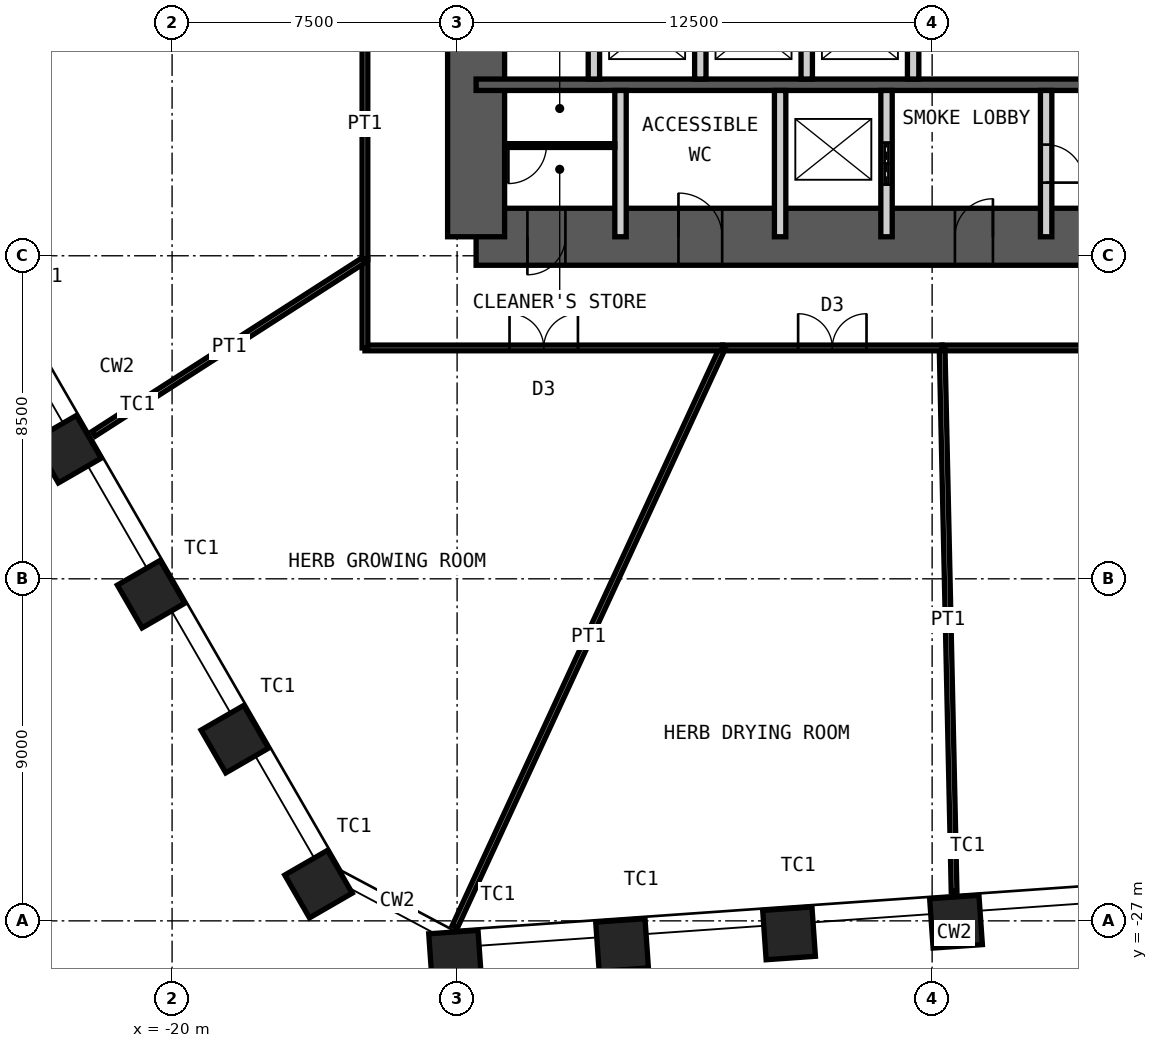
"""IFC4 building model, lengths in metres.
Left out: names, types, materials, properties, quantities, classifications, styles, units other than length and angle.
Written with IfcOpenShell. Run it as: python <this file> out.ifc"""

import sys

from ifc_helpers import new_model, si_unit, direction, frame, frame_2d, origin, origin_2d, place, context, subcontext, project, spatial, rectangle, hollow_rectangle, extrude, element, fill, save


model = new_model("IFC4")
c1 = context("Model", 3, precision=1e-05, world=origin(), true_north=direction((0.0, 1.0)))
c2 = subcontext(c1, "Body", "Model", "MODEL_VIEW")
j1 = project(units=[si_unit("LENGTHUNIT", "METRE"), si_unit("PLANEANGLEUNIT", "RADIAN")], contexts=[c1])
p1 = place(None, origin())
s1 = spatial("IfcSite", under=j1, at=p1, CompositionType="ELEMENT")
p2 = place(p1, origin())
s2 = spatial("IfcBuilding", under=s1, at=p2, CompositionType="ELEMENT")
p3 = place(p2, frame((0.0, 0.0, 52.0)))
s3 = spatial("IfcBuildingStorey", under=s2, at=p3, CompositionType="ELEMENT", Elevation=52.0)
for number, where, z_axis, x_axis in (
    (1, (0.629, -27.022, 0.0), (0.0, 0.0, 1.0), (0.998, 0.07, 0.0)),
    (2, (-3.765, -27.329, 0.0), (0.0, 0.0, 1.0), (0.998, 0.07, 0.0)),
    (3, (-8.159, -27.636, 0.0), (0.0, 0.0, 1.0), (0.998, 0.07, 0.0)),
    (4, (-12.553, -27.944, 0.0), (0.0, 0.0, 1.0), (0.998, 0.07, 0.0)),
    (5, (-16.147, -26.033, 0.0), (0.0, 0.0, 1.0), (0.5, -0.866, 0.0)),
    (6, (-18.349, -22.218, 0.0), (0.0, 0.0, 1.0), (0.5, -0.866, 0.0)),
    (7, (-20.552, -18.404, 0.0), (0.0, 0.0, 1.0), (0.5, -0.866, 0.0)),
    (8, (-22.754, -14.589, 0.0), (0.0, 0.0, 1.0), (0.5, -0.866, 0.0)),
):
    element("IfcColumn", number, at=place(p3, frame(where, z_axis=z_axis, x_axis=x_axis)), inside=s3, PredefinedType="COLUMN", context=c2, shape_type="SweptSolid", body=[
        extrude(hollow_rectangle(XDim=1.3, YDim=1.3, WallThickness=0.1, at=origin_2d()), origin(), (0.0, 0.0, 1.0), 5.0),
    ])
p4 = place(p3, frame((-12.0, -9.0, 0.0), z_axis=(0.0, 0.0, 1.0), x_axis=(1.0, 0.0, 0.0)))
e9 = element("IfcWall", 9, at=p4, inside=s3, PredefinedType="SHEAR", context=c2, shape_type="SweptSolid", body=[
    extrude(rectangle(XDim=24.0, YDim=1.5, at=frame_2d((12.0, 0.0))), origin(), (0.0, 0.0, 1.0), 5.0),
])
p5 = place(p4, frame((1.35, 0.0, 0.0)))
e10 = element("IfcOpeningElement", 10, at=p5, cuts=e9, PredefinedType="OPENING", context=c2, shape_type="SweptSolid", body=[
    extrude(rectangle(XDim=1.0, YDim=2.1, at=frame_2d((0.5, 1.05))), frame((0.0, 0.76, 0.0), z_axis=(0.0, -1.0, 0.0), x_axis=(1.0, 0.0, 0.0)), (0.0, 0.0, 1.0), 1.52),
])
p6 = place(p4, frame((5.325, 0.0, 0.0)))
e11 = element("IfcOpeningElement", 11, at=p6, cuts=e9, PredefinedType="OPENING", context=c2, shape_type="SweptSolid", body=[
    extrude(rectangle(XDim=1.15, YDim=2.1, at=frame_2d((0.575, 1.05))), frame((0.0, 0.76, 0.0), z_axis=(0.0, -1.0, 0.0), x_axis=(1.0, 0.0, 0.0)), (0.0, 0.0, 1.0), 1.52),
])
p7 = place(p4, frame((12.6, 0.0, 0.0)))
e12 = element("IfcOpeningElement", 12, at=p7, cuts=e9, PredefinedType="OPENING", context=c2, shape_type="SweptSolid", body=[
    extrude(rectangle(XDim=1.0, YDim=2.1, at=frame_2d((0.5, 1.05))), frame((0.0, 0.76, 0.0), z_axis=(0.0, -1.0, 0.0), x_axis=(1.0, 0.0, 0.0)), (0.0, 0.0, 1.0), 1.52),
])
p8 = place(p3, frame((-12.0, -9.0, 0.0), z_axis=(0.0, 0.0, 1.0), x_axis=(0.0, 1.0, 0.0)))
e13 = element("IfcWall", 13, at=p8, inside=s3, PredefinedType="SHEAR", context=c2, shape_type="SweptSolid", body=[
    extrude(rectangle(XDim=18.0, YDim=1.5, at=frame_2d((9.0, 0.0))), origin(), (0.0, 0.0, 1.0), 5.0),
])
p9 = place(p8, frame((8.1, 0.0, 0.0)))
e14 = element("IfcOpeningElement", 14, at=p9, cuts=e13, PredefinedType="OPENING", context=c2, shape_type="SweptSolid", body=[
    extrude(rectangle(XDim=1.8, YDim=2.1, at=frame_2d((0.9, 1.05))), frame((0.0, 0.76, 0.0), z_axis=(0.0, -1.0, 0.0), x_axis=(1.0, 0.0, 0.0)), (0.0, 0.0, 1.0), 1.52),
])
p10 = place(p3, frame((-12.0, -5.0, 0.0), z_axis=(0.0, 0.0, 1.0), x_axis=(1.0, 0.0, 0.0)))
e15 = element("IfcWall", 15, at=p10, inside=s3, PredefinedType="SHEAR", context=c2, shape_type="SweptSolid", body=[
    extrude(rectangle(XDim=24.0, YDim=0.3, at=frame_2d((12.0, 0.0))), origin(), (0.0, 0.0, 1.0), 5.0),
])
for number, where, z_axis, x_axis in (
    (16, (-8.9, -4.85, 0.0), (0.0, 0.0, 1.0), (0.0, 1.0, 0.0)),
    (17, (-6.1, -4.85, 0.0), (0.0, 0.0, 1.0), (0.0, 1.0, 0.0)),
    (18, (-3.3, -4.85, 0.0), (0.0, 0.0, 1.0), (0.0, 1.0, 0.0)),
    (19, (-0.5, -4.85, 0.0), (0.0, 0.0, 1.0), (0.0, 1.0, 0.0)),
):
    element("IfcWall", number, at=place(p3, frame(where, z_axis=z_axis, x_axis=x_axis)), inside=s3, PredefinedType="PARTITIONING", context=c2, shape_type="SweptSolid", body=[
        extrude(rectangle(XDim=2.65, YDim=0.3, at=frame_2d((1.325, 0.0))), origin(), (0.0, 0.0, 1.0), 4.78),
    ])
for number, where, z_axis, x_axis in (
    (20, (-8.2, -9.0, 0.0), (0.0, 0.0, 1.0), (0.0, 1.0, 0.0)),
    (21, (-4.0, -9.0, 0.0), (0.0, 0.0, 1.0), (0.0, 1.0, 0.0)),
):
    element("IfcWall", number, at=place(p3, frame(where, z_axis=z_axis, x_axis=x_axis)), inside=s3, PredefinedType="PARTITIONING", context=c2, shape_type="SweptSolid", body=[
        extrude(rectangle(XDim=3.85, YDim=0.3, at=frame_2d((1.925, 0.0))), origin(), (0.0, 0.0, 1.0), 4.78),
    ])
p11 = place(p3, frame((-1.2, -9.0, 0.0), z_axis=(0.0, 0.0, 1.0), x_axis=(0.0, 1.0, 0.0)))
e22 = element("IfcWall", 22, at=p11, inside=s3, PredefinedType="PARTITIONING", context=c2, shape_type="SweptSolid", body=[
    extrude(rectangle(XDim=3.85, YDim=0.3, at=frame_2d((1.925, 0.0))), origin(), (0.0, 0.0, 1.0), 4.78),
])
p12 = place(p11, frame((1.375, 0.0, 0.0)))
e23 = element("IfcOpeningElement", 23, at=p12, cuts=e22, PredefinedType="OPENING", context=c2, shape_type="SweptSolid", body=[
    extrude(rectangle(XDim=1.1, YDim=2.4, at=frame_2d((0.55, 1.2))), frame((0.0, 0.16, 0.0), z_axis=(0.0, -1.0, 0.0), x_axis=(1.0, 0.0, 0.0)), (0.0, 0.0, 1.0), 0.32),
])
p13 = place(p3, frame((3.0, -9.0, 0.0), z_axis=(0.0, 0.0, 1.0), x_axis=(0.0, 1.0, 0.0)))
e24 = element("IfcWall", 24, at=p13, inside=s3, PredefinedType="PARTITIONING", context=c2, shape_type="SweptSolid", body=[
    extrude(rectangle(XDim=3.85, YDim=0.3, at=frame_2d((1.925, 0.0))), origin(), (0.0, 0.0, 1.0), 4.78),
])
p14 = place(p13, frame((1.425, 0.0, 0.0)))
e25 = element("IfcOpeningElement", 25, at=p14, cuts=e24, PredefinedType="OPENING", context=c2, shape_type="SweptSolid", body=[
    extrude(rectangle(XDim=1.0, YDim=2.1, at=frame_2d((0.5, 1.05))), frame((0.0, 0.16, 0.0), z_axis=(0.0, -1.0, 0.0), x_axis=(1.0, 0.0, 0.0)), (0.0, 0.0, 1.0), 0.32),
])
p15 = place(p3, frame((-11.25, -6.6, 0.0), z_axis=(0.0, 0.0, 1.0), x_axis=(1.0, 0.0, 0.0)))
e26 = element("IfcWall", 26, at=p15, inside=s3, PredefinedType="PARTITIONING", context=c2, shape_type="SweptSolid", body=[
    extrude(rectangle(XDim=2.9, YDim=0.1, at=frame_2d((1.45, 0.0))), origin(), (0.0, 0.0, 1.0), 4.78),
])
p16 = place(p15, frame((0.1, 0.0, 0.0)))
e27 = element("IfcOpeningElement", 27, at=p16, cuts=e26, PredefinedType="OPENING", context=c2, shape_type="SweptSolid", body=[
    extrude(rectangle(XDim=1.0, YDim=2.4, at=frame_2d((0.5, 1.2))), frame((0.0, 0.06, 0.0), z_axis=(0.0, -1.0, 0.0), x_axis=(1.0, 0.0, 0.0)), (0.0, 0.0, 1.0), 0.12),
])
p17 = place(p3, frame((11.508, -11.925, 0.0), z_axis=(0.0, 0.0, 1.0), x_axis=(-1.0, 0.0, 0.0)))
e28 = element("IfcWall", 28, at=p17, inside=s3, PredefinedType="PARTITIONING", context=c2, shape_type="SweptSolid", body=[
    extrude(rectangle(XDim=11.245, YDim=0.15, at=frame_2d((5.623, 0.0))), origin(), (0.0, 0.0, 1.0), 4.8),
])
p18 = place(p17, frame((4.722, 0.0, 0.0)))
e29 = element("IfcOpeningElement", 29, at=p18, cuts=e28, PredefinedType="OPENING", context=c2, shape_type="SweptSolid", body=[
    extrude(rectangle(XDim=1.8, YDim=2.4, at=frame_2d((0.9, 1.2))), frame((0.0, 0.085, 0.0), z_axis=(0.0, -1.0, 0.0), x_axis=(1.0, 0.0, 0.0)), (0.0, 0.0, 1.0), 0.17),
])
p19 = place(p3, frame((0.578, -26.224, 0.0), z_axis=(0.0, 0.0, 1.0), x_axis=(-0.022037776667, 0.999757138709, 0.0)))
e30 = element("IfcWall", 30, at=p19, inside=s3, PredefinedType="PARTITIONING", context=c2, shape_type="SweptSolid", body=[
    extrude(rectangle(XDim=14.302, YDim=0.15, at=frame_2d((7.151, 0.0))), origin(), (0.0, 0.0, 1.0), 3.7),
])
p20 = place(p3, frame((0.263, -11.925, 0.0), z_axis=(0.0, 0.0, 1.0), x_axis=(-1.0, 0.0, 0.0)))
e31 = element("IfcWall", 31, at=p20, inside=s3, PredefinedType="PARTITIONING", context=c2, shape_type="SweptSolid", body=[
    extrude(rectangle(XDim=5.778, YDim=0.15, at=frame_2d((2.889, 0.0))), origin(), (0.0, 0.0, 1.0), 4.8),
])
p21 = place(p20, frame((1.989, 0.0, 0.0)))
e32 = element("IfcOpeningElement", 32, at=p21, cuts=e31, PredefinedType="OPENING", context=c2, shape_type="SweptSolid", body=[
    extrude(rectangle(XDim=1.8, YDim=2.4, at=frame_2d((0.9, 1.2))), frame((0.0, 0.085, 0.0), z_axis=(0.0, -1.0, 0.0), x_axis=(1.0, 0.0, 0.0)), (0.0, 0.0, 1.0), 0.17),
])
p22 = place(p3, frame((-12.56, -27.155, 0.0), z_axis=(0.0, 0.0, 1.0), x_axis=(0.41979248878, 0.90762011126, 0.0)))
e33 = element("IfcWall", 33, at=p22, inside=s3, PredefinedType="PARTITIONING", context=c2, shape_type="SweptSolid", body=[
    extrude(rectangle(XDim=16.78, YDim=0.15, at=frame_2d((8.39, 0.0))), origin(), (0.0, 0.0, 1.0), 3.7),
])
p23 = place(p3, frame((-5.516, -11.925, 0.0), z_axis=(0.0, 0.0, 1.0), x_axis=(-1.0, 0.0, 0.0)))
e34 = element("IfcWall", 34, at=p23, inside=s3, PredefinedType="PARTITIONING", context=c2, shape_type="SweptSolid", body=[
    extrude(rectangle(XDim=9.409, YDim=0.15, at=frame_2d((4.705, 0.0))), origin(), (0.0, 0.0, 1.0), 4.8),
])
p24 = place(p23, frame((3.805, 0.0, 0.0)))
e35 = element("IfcOpeningElement", 35, at=p24, cuts=e34, PredefinedType="OPENING", context=c2, shape_type="SweptSolid", body=[
    extrude(rectangle(XDim=1.8, YDim=2.4, at=frame_2d((0.9, 1.2))), frame((0.0, 0.085, 0.0), z_axis=(0.0, -1.0, 0.0), x_axis=(1.0, 0.0, 0.0)), (0.0, 0.0, 1.0), 0.17),
])
p25 = place(p3, frame((-14.925, -11.925, 0.0), z_axis=(0.0, 0.0, 1.0), x_axis=(0.0, 1.0, 0.0)))
e36 = element("IfcWall", 36, at=p25, inside=s3, PredefinedType="PARTITIONING", context=c2, shape_type="SweptSolid", body=[
    extrude(rectangle(XDim=2.329, YDim=0.15, at=frame_2d((1.165, 0.0))), origin(), (0.0, 0.0, 1.0), 4.8),
])
p26 = place(p3, frame((-22.063, -14.185, 0.0), z_axis=(0.0, 0.0, 1.0), x_axis=(0.841158845851, 0.540788124912, 0.0)))
e37 = element("IfcWall", 37, at=p26, inside=s3, PredefinedType="PARTITIONING", context=c2, shape_type="SweptSolid", body=[
    extrude(rectangle(XDim=8.486, YDim=0.15, at=frame_2d((4.243, 0.0))), origin(), (0.0, 0.0, 1.0), 3.7),
])
p27 = place(p3, frame((-14.925, -9.596, 0.0), z_axis=(0.0, 0.0, 1.0), x_axis=(0.0, 1.0, 0.0)))
e38 = element("IfcWall", 38, at=p27, inside=s3, PredefinedType="PARTITIONING", context=c2, shape_type="SweptSolid", body=[
    extrude(rectangle(XDim=17.78, YDim=0.15, at=frame_2d((8.89, 0.0))), origin(), (0.0, 0.0, 1.0), 4.8),
])
p28 = place(p27, frame((7.99, 0.0, 0.0)))
e39 = element("IfcOpeningElement", 39, at=p28, cuts=e38, PredefinedType="OPENING", context=c2, shape_type="SweptSolid", body=[
    extrude(rectangle(XDim=1.8, YDim=2.4, at=frame_2d((0.9, 1.2))), frame((0.0, 0.085, 0.0), z_axis=(0.0, -1.0, 0.0), x_axis=(1.0, 0.0, 0.0)), (0.0, 0.0, 1.0), 0.17),
])
p29 = place(p5, origin())
e40 = element("IfcDoor", 40, at=p29, inside=s3, OperationType="SINGLE_SWING_LEFT", PredefinedType="DOOR", context=c2, shape_type="SweptSolid", body=[
    extrude(rectangle(XDim=1.0, YDim=2.1, at=frame_2d((0.5, 1.05))), frame((0.0, 0.025, 0.0), z_axis=(0.0, -1.0, 0.0), x_axis=(1.0, 0.0, 0.0)), (0.0, 0.0, 1.0), 0.05),
])
fill(e10, e40)
p30 = place(p6, origin())
e41 = element("IfcDoor", 41, at=p30, inside=s3, OperationType="SINGLE_SWING_RIGHT", PredefinedType="DOOR", context=c2, shape_type="SweptSolid", body=[
    extrude(rectangle(XDim=1.15, YDim=2.1, at=frame_2d((0.575, 1.05))), frame((0.0, 0.025, 0.0), z_axis=(0.0, -1.0, 0.0), x_axis=(1.0, 0.0, 0.0)), (0.0, 0.0, 1.0), 0.05),
])
fill(e11, e41)
p31 = place(p7, origin())
e42 = element("IfcDoor", 42, at=p31, inside=s3, OperationType="SINGLE_SWING_LEFT", PredefinedType="DOOR", context=c2, shape_type="SweptSolid", body=[
    extrude(rectangle(XDim=1.0, YDim=2.1, at=frame_2d((0.5, 1.05))), frame((0.0, 0.025, 0.0), z_axis=(0.0, -1.0, 0.0), x_axis=(1.0, 0.0, 0.0)), (0.0, 0.0, 1.0), 0.05),
])
fill(e12, e42)
p32 = place(p14, origin())
e43 = element("IfcDoor", 43, at=p32, inside=s3, OperationType="SINGLE_SWING_LEFT", PredefinedType="DOOR", context=c2, shape_type="SweptSolid", body=[
    extrude(rectangle(XDim=1.0, YDim=2.1, at=frame_2d((0.5, 1.05))), frame((0.0, 0.025, 0.0), z_axis=(0.0, -1.0, 0.0), x_axis=(1.0, 0.0, 0.0)), (0.0, 0.0, 1.0), 0.05),
])
fill(e25, e43)
p33 = place(p12, origin())
e44 = element("IfcDoor", 44, at=p33, inside=s3, OperationType="DOUBLE_DOOR_SLIDING", PredefinedType="DOOR", context=c2, shape_type="SweptSolid", body=[
    extrude(rectangle(XDim=1.1, YDim=2.4, at=frame_2d((0.55, 1.2))), frame((0.0, 0.025, 0.0), z_axis=(0.0, -1.0, 0.0), x_axis=(1.0, 0.0, 0.0)), (0.0, 0.0, 1.0), 0.05),
])
fill(e23, e44)
p34 = place(p16, origin())
e45 = element("IfcDoor", 45, at=p34, inside=s3, OperationType="SINGLE_SWING_LEFT", PredefinedType="DOOR", context=c2, shape_type="SweptSolid", body=[
    extrude(rectangle(XDim=1.0, YDim=2.4, at=frame_2d((0.5, 1.2))), frame((0.0, 0.025, 0.0), z_axis=(0.0, -1.0, 0.0), x_axis=(1.0, 0.0, 0.0)), (0.0, 0.0, 1.0), 0.05),
])
fill(e27, e45)
p35 = place(p21, origin())
e46 = element("IfcDoor", 46, at=p35, inside=s3, OperationType="DOUBLE_DOOR_DOUBLE_SWING", PredefinedType="DOOR", context=c2, shape_type="SweptSolid", body=[
    extrude(rectangle(XDim=1.8, YDim=2.4, at=frame_2d((0.9, 1.2))), frame((0.0, 0.025, 0.0), z_axis=(0.0, -1.0, 0.0), x_axis=(1.0, 0.0, 0.0)), (0.0, 0.0, 1.0), 0.05),
])
fill(e32, e46)
p36 = place(p24, origin())
e47 = element("IfcDoor", 47, at=p36, inside=s3, OperationType="DOUBLE_DOOR_DOUBLE_SWING", PredefinedType="DOOR", context=c2, shape_type="SweptSolid", body=[
    extrude(rectangle(XDim=1.8, YDim=2.4, at=frame_2d((0.9, 1.2))), frame((0.0, 0.025, 0.0), z_axis=(0.0, -1.0, 0.0), x_axis=(1.0, 0.0, 0.0)), (0.0, 0.0, 1.0), 0.05),
])
fill(e35, e47)
save(model, sys.argv[1])
